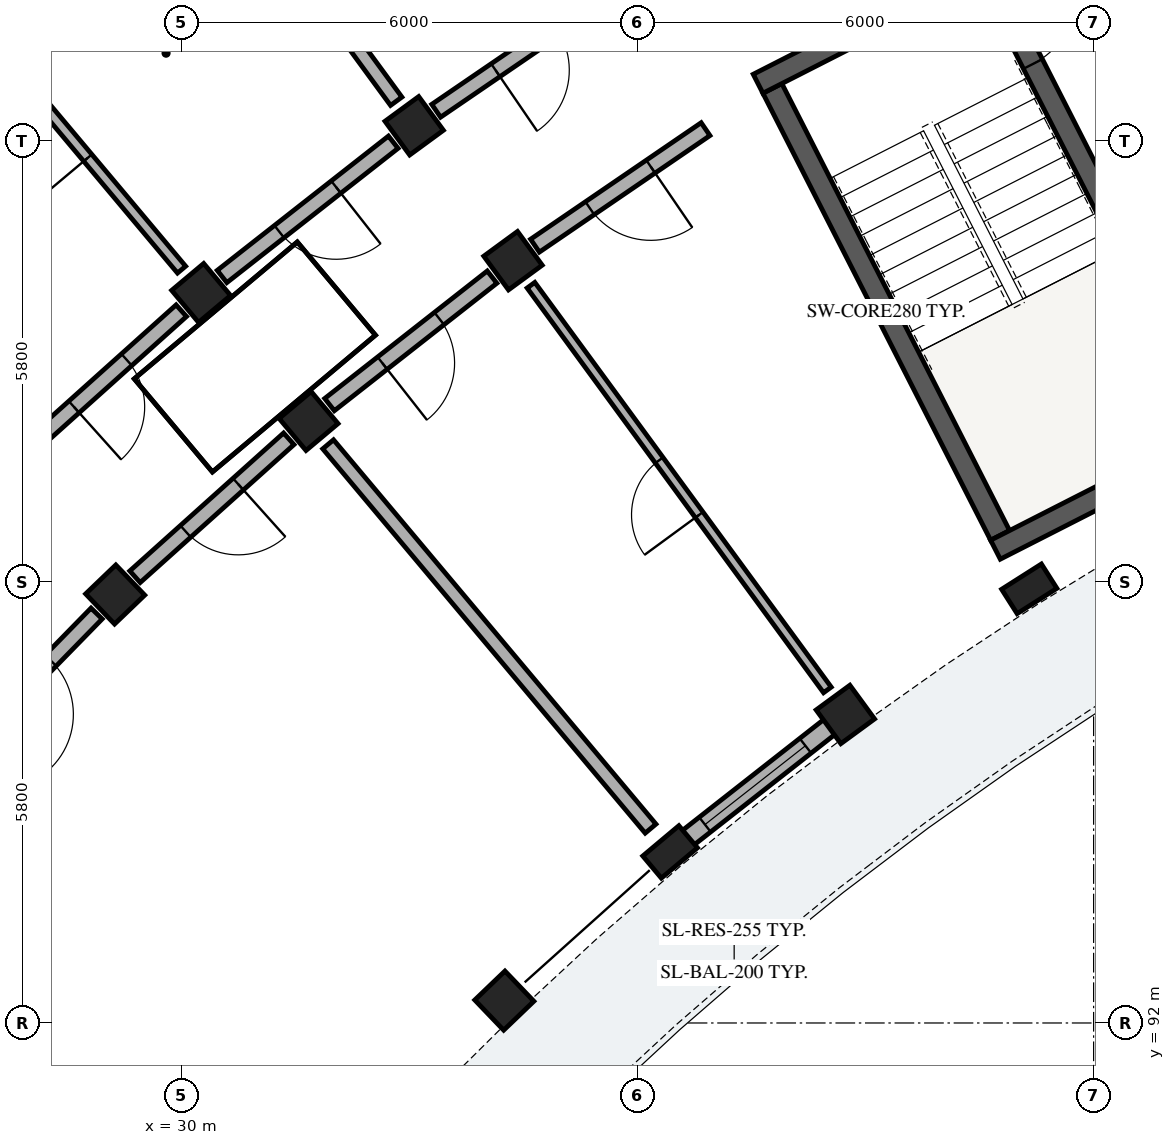
"""IFC4 building model, lengths in metres.
Left out: names, types, materials, properties, quantities, classifications, styles, units other than length and angle.
Written with IfcOpenShell. Run it as: python <this file> out.ifc"""

import sys

from ifc_helpers import new_model, si_unit, direction, frame, frame_2d, origin, origin_2d, place, context, subcontext, project, spatial, rectangle, extrude, element, fill, save


model = new_model("IFC4")
c1 = context("Model", 3, precision=1e-05, world=origin(), true_north=direction((0.0, 1.0)))
c2 = subcontext(c1, "Body", "Model", "MODEL_VIEW")
j1 = project(units=[si_unit("LENGTHUNIT", "METRE"), si_unit("PLANEANGLEUNIT", "RADIAN")], contexts=[c1])
p1 = place(None, origin())
s1 = spatial("IfcSite", under=j1, at=p1, CompositionType="ELEMENT")
p2 = place(p1, origin())
s2 = spatial("IfcBuilding", under=s1, at=p2, CompositionType="ELEMENT")
p3 = place(p2, frame((0.0, 0.0, 8.84)))
s3 = spatial("IfcBuildingStorey", under=s2, at=p3, CompositionType="ELEMENT", Elevation=8.84)
p4 = place(p3, frame((37.773, 104.296, 0.0), z_axis=(0.0, 0.0, 1.0), x_axis=(0.453992276384, -0.891005618941, 0.0)))
e1 = element("IfcWall", 1, at=p4, inside=s3, PredefinedType="SHEAR", context=c2, shape_type="SweptSolid", body=[
    extrude(rectangle(XDim=6.6, YDim=0.28, at=frame_2d((3.3, 0.0))), origin(), (0.0, 0.0, 1.0), 3.11),
])
for number, where, z_axis, x_axis in (
    (2, (40.709, 98.227, 0.0), (0.0, 0.0, 1.0), (0.891, 0.454, 0.0)),
    (3, (37.585, 104.357, 0.0), (0.0, 0.0, 1.0), (0.891, 0.454, 0.0)),
):
    element("IfcWall", number, at=place(p3, frame(where, z_axis=z_axis, x_axis=x_axis)), inside=s3, PredefinedType="SHEAR", context=c2, shape_type="SweptSolid", body=[
        extrude(rectangle(XDim=3.48, YDim=0.28, at=frame_2d((1.74, 0.0))), origin(), (0.0, 0.0, 1.0), 3.11),
    ])
p5 = place(p3, frame((40.625, 105.748, 0.0), z_axis=(0.0, 0.0, 1.0), x_axis=(0.453992276384, -0.891005618941, 0.0)))
e4 = element("IfcWall", 4, at=p5, inside=s3, PredefinedType="SHEAR", context=c2, shape_type="SweptSolid", body=[
    extrude(rectangle(XDim=6.6, YDim=0.28, at=frame_2d((3.3, 0.0))), origin(), (0.0, 0.0, 1.0), 3.11),
])
p6 = place(p5, frame((0.22, 0.0, 0.0)))
e5 = element("IfcOpeningElement", 5, at=p6, cuts=e4, PredefinedType="OPENING", context=c2, shape_type="SweptSolid", body=[
    extrude(rectangle(XDim=1.05, YDim=2.15, at=frame_2d((0.525, 1.075))), frame((0.0, 0.15, 0.0), z_axis=(0.0, -1.0, 0.0), x_axis=(1.0, 0.0, 0.0)), (0.0, 0.0, 1.0), 0.3),
])
p7 = place(p3, frame((41.153, 97.712, 0.0), z_axis=(0.0, 0.0, 1.0), x_axis=(-0.536481603385, 0.843912015099, 0.0)))
e6 = element("IfcColumn", 6, at=p7, inside=s3, PredefinedType="PILASTER", context=c2, shape_type="SweptSolid", body=[
    extrude(rectangle(XDim=0.38, YDim=0.62, at=origin_2d()), origin(), (0.0, 0.0, 1.0), 3.105),
])
for number, where, z_axis, x_axis in (
    (7, (38.734, 96.059, 0.0), (0.0, 0.0, 1.0), (-0.591, 0.807, 0.0)),
    (8, (34.361, 102.029, 0.0), (0.0, 0.0, 1.0), (-0.591, 0.807, 0.0)),
    (9, (33.061, 103.804, 0.0), (0.0, 0.0, 1.0), (-0.591, 0.807, 0.0)),
):
    element("IfcColumn", number, at=place(p3, frame(where, z_axis=z_axis, x_axis=x_axis)), inside=s3, PredefinedType="COLUMN", context=c2, shape_type="SweptSolid", body=[
        extrude(rectangle(XDim=0.55, YDim=0.55, at=origin_2d()), origin(), (0.0, 0.0, 1.0), 3.105),
    ])
p8 = place(p3, frame((36.428, 94.251, 0.0), z_axis=(0.0, 0.0, 1.0), x_axis=(-0.642787636427, 0.766044420681, 0.0)))
e10 = element("IfcColumn", 10, at=p8, inside=s3, PredefinedType="PILASTER", context=c2, shape_type="SweptSolid", body=[
    extrude(rectangle(XDim=0.38, YDim=0.62, at=origin_2d()), origin(), (0.0, 0.0, 1.0), 3.105),
])
for number, where, z_axis, x_axis in (
    (11, (31.671, 99.919, 0.0), (0.0, 0.0, 1.0), (-0.643, 0.766, 0.0)),
    (12, (30.257, 101.605, 0.0), (0.0, 0.0, 1.0), (-0.643, 0.766, 0.0)),
    (13, (34.247, 92.294, 0.0), (0.0, 0.0, 1.0), (-0.692, 0.722, 0.0)),
    (14, (29.127, 97.637, 0.0), (0.0, 0.0, 1.0), (-0.692, 0.722, 0.0)),
):
    element("IfcColumn", number, at=place(p3, frame(where, z_axis=z_axis, x_axis=x_axis)), inside=s3, PredefinedType="COLUMN", context=c2, shape_type="SweptSolid", body=[
        extrude(rectangle(XDim=0.55, YDim=0.55, at=origin_2d()), origin(), (0.0, 0.0, 1.0), 3.105),
    ])
p9 = place(p3, frame((38.541, 95.908, 0.0), z_axis=(0.0, 0.0, 1.0), x_axis=(-0.786831325151, -0.617168101704, 0.0)))
e15 = element("IfcWall", 15, at=p9, inside=s3, PredefinedType="SOLIDWALL", context=c2, shape_type="SweptSolid", body=[
    extrude(rectangle(XDim=2.525, YDim=0.245, at=frame_2d((1.263, 0.0))), origin(), (0.0, 0.0, 1.0), 2.355),
])
p10 = place(p9, frame((0.423, 0.0, 0.55)))
e16 = element("IfcOpeningElement", 16, at=p10, cuts=e15, PredefinedType="OPENING", context=c2, shape_type="SweptSolid", body=[
    extrude(rectangle(XDim=1.68, YDim=1.585, at=frame_2d((0.84, 0.792))), frame((0.0, 0.133, 0.0), z_axis=(0.0, -1.0, 0.0), x_axis=(1.0, 0.0, 0.0)), (0.0, 0.0, 1.0), 0.265),
])
p11 = place(p3, frame((35.714, 105.616, 0.0), z_axis=(0.0, 0.0, 1.0), x_axis=(-0.825779671787, -0.563992848947, 0.0)))
e17 = element("IfcWall", 17, at=p11, inside=s3, PredefinedType="PARTITIONING", context=c2, shape_type="SweptSolid", body=[
    extrude(rectangle(XDim=2.863, YDim=0.205, at=frame_2d((1.432, 0.0))), origin(), (0.0, 0.0, 1.0), 2.37),
])
p12 = place(p11, frame((0.947, 0.0, 0.0)))
e18 = element("IfcOpeningElement", 18, at=p12, cuts=e17, PredefinedType="OPENING", context=c2, shape_type="SweptSolid", body=[
    extrude(rectangle(XDim=0.97, YDim=2.15, at=frame_2d((0.485, 1.075))), frame((0.0, 0.113, 0.0), z_axis=(0.0, -1.0, 0.0), x_axis=(1.0, 0.0, 0.0)), (0.0, 0.0, 1.0), 0.225),
])
p13 = place(p3, frame((36.895, 103.76, 0.0), z_axis=(0.0, 0.0, 1.0), x_axis=(-0.825752009056, -0.56403334967, 0.0)))
e19 = element("IfcWall", 19, at=p13, inside=s3, PredefinedType="PARTITIONING", context=c2, shape_type="SweptSolid", body=[
    extrude(rectangle(XDim=2.718, YDim=0.205, at=frame_2d((1.359, 0.0))), origin(), (0.0, 0.0, 1.0), 2.37),
])
p14 = place(p13, frame((0.874, 0.0, 0.0)))
e20 = element("IfcOpeningElement", 20, at=p14, cuts=e19, PredefinedType="OPENING", context=c2, shape_type="SweptSolid", body=[
    extrude(rectangle(XDim=0.97, YDim=2.15, at=frame_2d((0.485, 1.075))), frame((0.0, 0.113, 0.0), z_axis=(0.0, -1.0, 0.0), x_axis=(1.0, 0.0, 0.0)), (0.0, 0.0, 1.0), 0.225),
])
p15 = place(p3, frame((32.824, 104.126, 0.0), z_axis=(0.0, 0.0, 1.0), x_axis=(-0.590910940129, 0.806736797745, 0.0)))
e21 = element("IfcWall", 21, at=p15, inside=s3, PredefinedType="PARTITIONING", context=c2, shape_type="SweptSolid", body=[
    extrude(rectangle(XDim=4.7, YDim=0.185, at=frame_2d((2.35, 0.0))), origin(), (0.0, 0.0, 1.0), 2.37),
])
p16 = place(p3, frame((38.497, 96.382, 0.0), z_axis=(0.0, 0.0, 1.0), x_axis=(-0.590924179316, 0.806727100263, 0.0)))
e22 = element("IfcWall", 22, at=p16, inside=s3, PredefinedType="PARTITIONING", context=c2, shape_type="SweptSolid", body=[
    extrude(rectangle(XDim=6.6, YDim=0.125, at=frame_2d((3.3, 0.0))), origin(), (0.0, 0.0, 1.0), 2.37),
])
p17 = place(p16, frame((2.855, 0.0, 0.0)))
e23 = element("IfcOpeningElement", 23, at=p17, cuts=e22, PredefinedType="OPENING", context=c2, shape_type="SweptSolid", body=[
    extrude(rectangle(XDim=0.89, YDim=2.1, at=frame_2d((0.445, 1.05))), frame((0.0, 0.073, 0.0), z_axis=(0.0, -1.0, 0.0), x_axis=(1.0, 0.0, 0.0)), (0.0, 0.0, 1.0), 0.145),
])
p18 = place(p3, frame((32.785, 103.588, 0.0), z_axis=(0.0, 0.0, 1.0), x_axis=(-0.786806323554, -0.617199975061, 0.0)))
e24 = element("IfcWall", 24, at=p18, inside=s3, PredefinedType="PARTITIONING", context=c2, shape_type="SweptSolid", body=[
    extrude(rectangle(XDim=2.863, YDim=0.205, at=frame_2d((1.432, 0.0))), origin(), (0.0, 0.0, 1.0), 2.37),
])
p19 = place(p18, frame((0.957, 0.0, 0.0)))
e25 = element("IfcOpeningElement", 25, at=p19, cuts=e24, PredefinedType="OPENING", context=c2, shape_type="SweptSolid", body=[
    extrude(rectangle(XDim=0.95, YDim=2.13, at=frame_2d((0.475, 1.065))), frame((0.0, 0.113, 0.0), z_axis=(0.0, -1.0, 0.0), x_axis=(1.0, 0.0, 0.0)), (0.0, 0.0, 1.0), 0.225),
])
p20 = place(p3, frame((34.085, 101.813, 0.0), z_axis=(0.0, 0.0, 1.0), x_axis=(-0.786835457019, -0.617162833924, 0.0)))
e26 = element("IfcWall", 26, at=p20, inside=s3, PredefinedType="PARTITIONING", context=c2, shape_type="SweptSolid", body=[
    extrude(rectangle(XDim=2.718, YDim=0.205, at=frame_2d((1.359, 0.0))), origin(), (0.0, 0.0, 1.0), 2.37),
])
p21 = place(p20, frame((0.884, 0.0, 0.0)))
e27 = element("IfcOpeningElement", 27, at=p21, cuts=e26, PredefinedType="OPENING", context=c2, shape_type="SweptSolid", body=[
    extrude(rectangle(XDim=0.95, YDim=2.13, at=frame_2d((0.475, 1.065))), frame((0.0, 0.113, 0.0), z_axis=(0.0, -1.0, 0.0), x_axis=(1.0, 0.0, 0.0)), (0.0, 0.0, 1.0), 0.225),
])
p22 = place(p3, frame((30.0, 101.911, 0.0), z_axis=(0.0, 0.0, 1.0), x_axis=(-0.642811926223, 0.766024038465, 0.0)))
e28 = element("IfcWall", 28, at=p22, inside=s3, PredefinedType="PLUMBINGWALL", context=c2, shape_type="SweptSolid", body=[
    extrude(rectangle(XDim=4.7, YDim=0.14, at=frame_2d((2.35, 0.0))), origin(), (0.0, 0.0, 1.0), 2.37),
])
p23 = place(p22, frame((1.92, 0.0, 0.0)))
e29 = element("IfcOpeningElement", 29, at=p23, cuts=e28, PredefinedType="OPENING", context=c2, shape_type="SweptSolid", body=[
    extrude(rectangle(XDim=0.86, YDim=2.06, at=frame_2d((0.43, 1.03))), frame((0.0, 0.08, 0.0), z_axis=(0.0, -1.0, 0.0), x_axis=(1.0, 0.0, 0.0)), (0.0, 0.0, 1.0), 0.16),
])
p24 = place(p3, frame((36.171, 94.557, 0.0), z_axis=(0.0, 0.0, 1.0), x_axis=(-0.642789470807, 0.766042881449, 0.0)))
e30 = element("IfcWall", 30, at=p24, inside=s3, PredefinedType="PARTITIONING", context=c2, shape_type="SweptSolid", body=[
    extrude(rectangle(XDim=6.6, YDim=0.185, at=frame_2d((3.3, 0.0))), origin(), (0.0, 0.0, 1.0), 2.37),
])
p25 = place(p3, frame((29.997, 101.371, 0.0), z_axis=(0.0, 0.0, 1.0), x_axis=(-0.744433521088, -0.667696587291, 0.0)))
e31 = element("IfcWall", 31, at=p25, inside=s3, PredefinedType="PARTITIONING", context=c2, shape_type="SweptSolid", body=[
    extrude(rectangle(XDim=2.863, YDim=0.205, at=frame_2d((1.432, 0.0))), origin(), (0.0, 0.0, 1.0), 2.37),
])
p26 = place(p25, frame((0.967, 0.0, 0.0)))
e32 = element("IfcOpeningElement", 32, at=p26, cuts=e31, PredefinedType="OPENING", context=c2, shape_type="SweptSolid", body=[
    extrude(rectangle(XDim=0.93, YDim=2.12, at=frame_2d((0.465, 1.06))), frame((0.0, 0.113, 0.0), z_axis=(0.0, -1.0, 0.0), x_axis=(1.0, 0.0, 0.0)), (0.0, 0.0, 1.0), 0.225),
])
p27 = place(p3, frame((31.411, 99.686, 0.0), z_axis=(0.0, 0.0, 1.0), x_axis=(-0.744418559135, -0.667713268413, 0.0)))
e33 = element("IfcWall", 33, at=p27, inside=s3, PredefinedType="PARTITIONING", context=c2, shape_type="SweptSolid", body=[
    extrude(rectangle(XDim=2.718, YDim=0.205, at=frame_2d((1.359, 0.0))), origin(), (0.0, 0.0, 1.0), 2.37),
])
p28 = place(p27, frame((0.894, 0.0, 0.0)))
e34 = element("IfcOpeningElement", 34, at=p28, cuts=e33, PredefinedType="OPENING", context=c2, shape_type="SweptSolid", body=[
    extrude(rectangle(XDim=0.93, YDim=2.12, at=frame_2d((0.465, 1.06))), frame((0.0, 0.113, 0.0), z_axis=(0.0, -1.0, 0.0), x_axis=(1.0, 0.0, 0.0)), (0.0, 0.0, 1.0), 0.225),
])
p29 = place(p3, frame((28.882, 97.387, 0.0), z_axis=(0.0, 0.0, 1.0), x_axis=(-0.698840007829, -0.715278018296, 0.0)))
e35 = element("IfcWall", 35, at=p29, inside=s3, PredefinedType="PARTITIONING", context=c2, shape_type="SweptSolid", body=[
    extrude(rectangle(XDim=2.718, YDim=0.205, at=frame_2d((1.359, 0.0))), origin(), (0.0, 0.0, 1.0), 2.37),
])
p30 = place(p29, frame((0.864, 0.0, 0.0)))
e36 = element("IfcOpeningElement", 36, at=p30, cuts=e35, PredefinedType="OPENING", context=c2, shape_type="SweptSolid", body=[
    extrude(rectangle(XDim=0.99, YDim=2.16, at=frame_2d((0.495, 1.08))), frame((0.0, 0.113, 0.0), z_axis=(0.0, -1.0, 0.0), x_axis=(1.0, 0.0, 0.0)), (0.0, 0.0, 1.0), 0.225),
])
p31 = place(p10, origin())
e37 = element("IfcWindow", 37, at=p31, inside=s3, PartitioningType="SINGLE_PANEL", PredefinedType="WINDOW", context=c2, shape_type="SweptSolid", body=[
    extrude(rectangle(XDim=1.68, YDim=1.585, at=frame_2d((0.84, 0.792))), frame((0.0, 0.03, 0.0), z_axis=(0.0, -1.0, 0.0), x_axis=(1.0, 0.0, 0.0)), (0.0, 0.0, 1.0), 0.06),
])
fill(e16, e37)
p32 = place(p6, origin())
e38 = element("IfcDoor", 38, at=p32, inside=s3, OperationType="SINGLE_SWING_LEFT", PredefinedType="DOOR", context=c2, shape_type="SweptSolid", body=[
    extrude(rectangle(XDim=1.05, YDim=2.15, at=frame_2d((0.525, 1.075))), frame((0.0, 0.025, 0.0), z_axis=(0.0, -1.0, 0.0), x_axis=(1.0, 0.0, 0.0)), (0.0, 0.0, 1.0), 0.05),
])
fill(e5, e38)
p33 = place(p12, origin())
e39 = element("IfcDoor", 39, at=p33, inside=s3, OperationType="SINGLE_SWING_RIGHT", PredefinedType="DOOR", context=c2, shape_type="SweptSolid", body=[
    extrude(rectangle(XDim=0.97, YDim=2.15, at=frame_2d((0.485, 1.075))), frame((0.0, 0.025, 0.0), z_axis=(0.0, -1.0, 0.0), x_axis=(1.0, 0.0, 0.0)), (0.0, 0.0, 1.0), 0.05),
])
fill(e18, e39)
p34 = place(p14, origin())
e40 = element("IfcDoor", 40, at=p34, inside=s3, OperationType="SINGLE_SWING_LEFT", PredefinedType="DOOR", context=c2, shape_type="SweptSolid", body=[
    extrude(rectangle(XDim=0.97, YDim=2.15, at=frame_2d((0.485, 1.075))), frame((0.0, 0.025, 0.0), z_axis=(0.0, -1.0, 0.0), x_axis=(1.0, 0.0, 0.0)), (0.0, 0.0, 1.0), 0.05),
])
fill(e20, e40)
p35 = place(p17, origin())
e41 = element("IfcDoor", 41, at=p35, inside=s3, OperationType="SINGLE_SWING_LEFT", PredefinedType="DOOR", context=c2, shape_type="SweptSolid", body=[
    extrude(rectangle(XDim=0.89, YDim=2.1, at=frame_2d((0.445, 1.05))), frame((0.0, 0.025, 0.0), z_axis=(0.0, -1.0, 0.0), x_axis=(1.0, 0.0, 0.0)), (0.0, 0.0, 1.0), 0.05),
])
fill(e23, e41)
p36 = place(p19, origin())
e42 = element("IfcDoor", 42, at=p36, inside=s3, OperationType="SINGLE_SWING_LEFT", PredefinedType="DOOR", context=c2, shape_type="SweptSolid", body=[
    extrude(rectangle(XDim=0.95, YDim=2.13, at=frame_2d((0.475, 1.065))), frame((0.0, 0.025, 0.0), z_axis=(0.0, -1.0, 0.0), x_axis=(1.0, 0.0, 0.0)), (0.0, 0.0, 1.0), 0.05),
])
fill(e25, e42)
p37 = place(p21, origin())
e43 = element("IfcDoor", 43, at=p37, inside=s3, OperationType="SINGLE_SWING_RIGHT", PredefinedType="DOOR", context=c2, shape_type="SweptSolid", body=[
    extrude(rectangle(XDim=0.95, YDim=2.13, at=frame_2d((0.475, 1.065))), frame((0.0, 0.025, 0.0), z_axis=(0.0, -1.0, 0.0), x_axis=(1.0, 0.0, 0.0)), (0.0, 0.0, 1.0), 0.05),
])
fill(e27, e43)
p38 = place(p23, origin())
e44 = element("IfcDoor", 44, at=p38, inside=s3, OperationType="SINGLE_SWING_LEFT", PredefinedType="DOOR", context=c2, shape_type="SweptSolid", body=[
    extrude(rectangle(XDim=0.86, YDim=2.06, at=frame_2d((0.43, 1.03))), frame((0.0, 0.025, 0.0), z_axis=(0.0, -1.0, 0.0), x_axis=(1.0, 0.0, 0.0)), (0.0, 0.0, 1.0), 0.05),
])
fill(e29, e44)
p39 = place(p26, origin())
e45 = element("IfcDoor", 45, at=p39, inside=s3, OperationType="SINGLE_SWING_RIGHT", PredefinedType="DOOR", context=c2, shape_type="SweptSolid", body=[
    extrude(rectangle(XDim=0.93, YDim=2.12, at=frame_2d((0.465, 1.06))), frame((0.0, 0.025, 0.0), z_axis=(0.0, -1.0, 0.0), x_axis=(1.0, 0.0, 0.0)), (0.0, 0.0, 1.0), 0.05),
])
fill(e32, e45)
p40 = place(p28, origin())
e46 = element("IfcDoor", 46, at=p40, inside=s3, OperationType="SINGLE_SWING_LEFT", PredefinedType="DOOR", context=c2, shape_type="SweptSolid", body=[
    extrude(rectangle(XDim=0.93, YDim=2.12, at=frame_2d((0.465, 1.06))), frame((0.0, 0.025, 0.0), z_axis=(0.0, -1.0, 0.0), x_axis=(1.0, 0.0, 0.0)), (0.0, 0.0, 1.0), 0.05),
])
fill(e34, e46)
save(model, sys.argv[1])
